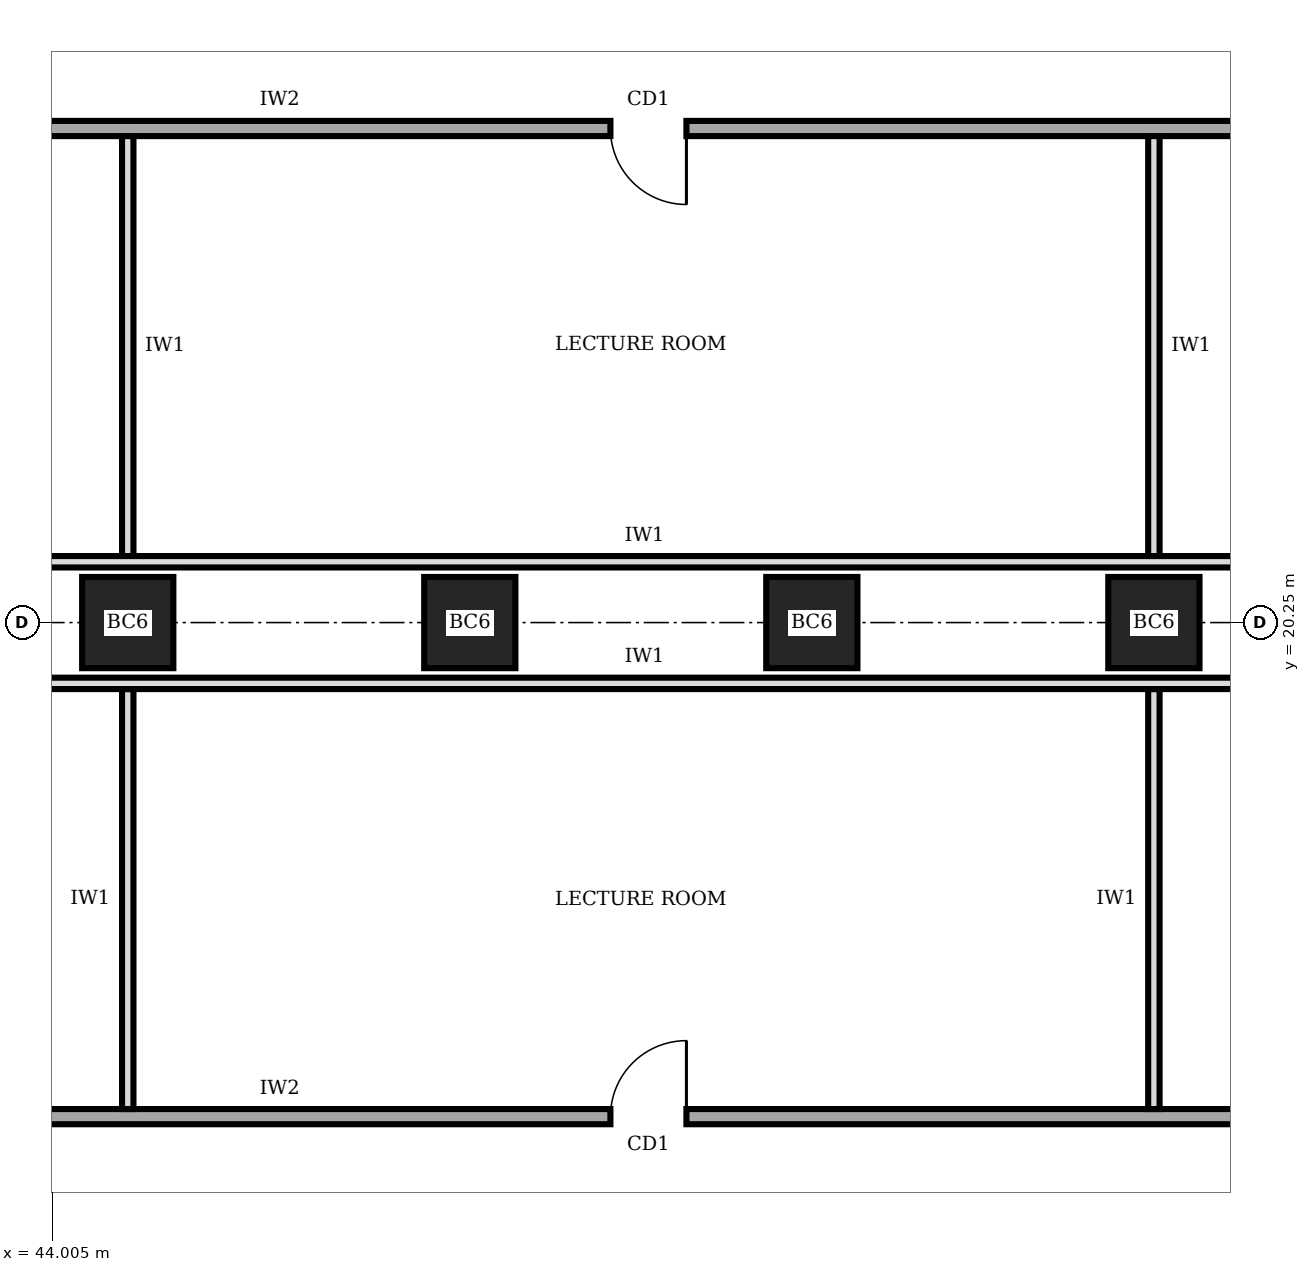
"""IFC4 building model, lengths in metres.
Left out: names, types, materials, properties, quantities, classifications, styles, units other than length and angle.
Written with IfcOpenShell. Run it as: python <this file> out.ifc"""

import sys

from ifc_helpers import new_model, si_unit, direction, frame, frame_2d, origin, origin_2d, place, context, subcontext, project, spatial, rectangle, extrude, element, fill, save


model = new_model("IFC4")
c1 = context("Model", 3, precision=1e-05, world=origin(), true_north=direction((0.0, 1.0)))
c2 = subcontext(c1, "Body", "Model", "MODEL_VIEW")
j1 = project(units=[si_unit("LENGTHUNIT", "METRE"), si_unit("PLANEANGLEUNIT", "RADIAN")], contexts=[c1])
p1 = place(None, origin())
s1 = spatial("IfcSite", under=j1, at=p1, CompositionType="ELEMENT")
p2 = place(p1, origin())
s2 = spatial("IfcBuilding", under=s1, at=p2, CompositionType="ELEMENT")
p3 = place(p2, frame((0.0, 0.0, 113.0)))
s3 = spatial("IfcBuildingStorey", under=s2, at=p3, CompositionType="ELEMENT", Elevation=113.0)
for number, where, z_axis, x_axis in (
    (1, (45.0, 20.25, 0.0), (0.0, 0.0, 1.0), (1.0, 0.0, 0.0)),
    (2, (49.5, 20.25, 0.0), (0.0, 0.0, 1.0), (1.0, 0.0, 0.0)),
    (3, (54.0, 20.25, 0.0), (0.0, 0.0, 1.0), (1.0, 0.0, 0.0)),
    (4, (58.5, 20.25, 0.0), (0.0, 0.0, 1.0), (1.0, 0.0, 0.0)),
):
    element("IfcColumn", number, at=place(p3, frame(where, z_axis=z_axis, x_axis=x_axis)), inside=s3, PredefinedType="COLUMN", context=c2, shape_type="SweptSolid", body=[
        extrude(rectangle(XDim=1.2, YDim=1.2, at=origin_2d()), origin(), (0.0, 0.0, 1.0), 4.0),
    ])
p4 = place(p3, frame((40.0, 13.75, 0.0), z_axis=(0.0, 0.0, 1.0), x_axis=(1.0, 0.0, 0.0)))
e5 = element("IfcWall", 5, at=p4, inside=s3, PredefinedType="SOLIDWALL", context=c2, shape_type="SweptSolid", body=[
    extrude(rectangle(XDim=23.5, YDim=0.2, at=frame_2d((11.75, 0.0))), origin(), (0.0, 0.0, 1.0), 3.75),
])
p5 = place(p4, frame((1.65, 0.0, 0.0)))
e6 = element("IfcOpeningElement", 6, at=p5, cuts=e5, PredefinedType="OPENING", context=c2, shape_type="SweptSolid", body=[
    extrude(rectangle(XDim=1.0, YDim=2.1, at=frame_2d((0.5, 1.05))), frame((0.0, 0.11, 0.0), z_axis=(0.0, -1.0, 0.0), x_axis=(1.0, 0.0, 0.0)), (0.0, 0.0, 1.0), 0.22),
])
p6 = place(p4, frame((11.35, 0.0, 0.0)))
e7 = element("IfcOpeningElement", 7, at=p6, cuts=e5, PredefinedType="OPENING", context=c2, shape_type="SweptSolid", body=[
    extrude(rectangle(XDim=1.0, YDim=2.1, at=frame_2d((0.5, 1.05))), frame((0.0, 0.11, 0.0), z_axis=(0.0, -1.0, 0.0), x_axis=(1.0, 0.0, 0.0)), (0.0, 0.0, 1.0), 0.22),
])
p7 = place(p4, frame((20.6, 0.0, 0.0)))
e8 = element("IfcOpeningElement", 8, at=p7, cuts=e5, PredefinedType="OPENING", context=c2, shape_type="SweptSolid", body=[
    extrude(rectangle(XDim=1.0, YDim=2.1, at=frame_2d((0.5, 1.05))), frame((0.0, 0.11, 0.0), z_axis=(0.0, -1.0, 0.0), x_axis=(1.0, 0.0, 0.0)), (0.0, 0.0, 1.0), 0.22),
])
p8 = place(p3, frame((40.0, 26.75, 0.0), z_axis=(0.0, 0.0, 1.0), x_axis=(1.0, 0.0, 0.0)))
e9 = element("IfcWall", 9, at=p8, inside=s3, PredefinedType="SOLIDWALL", context=c2, shape_type="SweptSolid", body=[
    extrude(rectangle(XDim=23.5, YDim=0.2, at=frame_2d((11.75, 0.0))), origin(), (0.0, 0.0, 1.0), 3.75),
])
p9 = place(p8, frame((1.65, 0.0, 0.0)))
e10 = element("IfcOpeningElement", 10, at=p9, cuts=e9, PredefinedType="OPENING", context=c2, shape_type="SweptSolid", body=[
    extrude(rectangle(XDim=1.0, YDim=2.1, at=frame_2d((0.5, 1.05))), frame((0.0, 0.11, 0.0), z_axis=(0.0, -1.0, 0.0), x_axis=(1.0, 0.0, 0.0)), (0.0, 0.0, 1.0), 0.22),
])
p10 = place(p8, frame((11.35, 0.0, 0.0)))
e11 = element("IfcOpeningElement", 11, at=p10, cuts=e9, PredefinedType="OPENING", context=c2, shape_type="SweptSolid", body=[
    extrude(rectangle(XDim=1.0, YDim=2.1, at=frame_2d((0.5, 1.05))), frame((0.0, 0.11, 0.0), z_axis=(0.0, -1.0, 0.0), x_axis=(1.0, 0.0, 0.0)), (0.0, 0.0, 1.0), 0.22),
])
p11 = place(p8, frame((20.6, 0.0, 0.0)))
e12 = element("IfcOpeningElement", 12, at=p11, cuts=e9, PredefinedType="OPENING", context=c2, shape_type="SweptSolid", body=[
    extrude(rectangle(XDim=1.0, YDim=2.1, at=frame_2d((0.5, 1.05))), frame((0.0, 0.11, 0.0), z_axis=(0.0, -1.0, 0.0), x_axis=(1.0, 0.0, 0.0)), (0.0, 0.0, 1.0), 0.22),
])
for number, where, z_axis, x_axis in (
    (13, (37.32, 19.45, 0.0), (0.0, 0.0, 1.0), (1.0, 0.0, 0.0)),
    (14, (37.32, 21.05, 0.0), (0.0, 0.0, 1.0), (1.0, 0.0, 0.0)),
):
    element("IfcWall", number, at=place(p3, frame(where, z_axis=z_axis, x_axis=x_axis)), inside=s3, PredefinedType="PARTITIONING", context=c2, shape_type="SweptSolid", body=[
        extrude(rectangle(XDim=28.96, YDim=0.15, at=frame_2d((14.48, 0.0))), origin(), (0.0, 0.0, 1.0), 3.75),
    ])
for number, where, z_axis, x_axis in (
    (15, (45.0, 13.85, 0.0), (0.0, 0.0, 1.0), (0.0, 1.0, 0.0)),
    (16, (58.5, 13.85, 0.0), (0.0, 0.0, 1.0), (0.0, 1.0, 0.0)),
    (17, (45.0, 26.65, 0.0), (0.0, 0.0, 1.0), (0.0, -1.0, 0.0)),
    (18, (58.5, 26.65, 0.0), (0.0, 0.0, 1.0), (0.0, -1.0, 0.0)),
):
    element("IfcWall", number, at=place(p3, frame(where, z_axis=z_axis, x_axis=x_axis)), inside=s3, PredefinedType="PARTITIONING", context=c2, shape_type="SweptSolid", body=[
        extrude(rectangle(XDim=5.525, YDim=0.15, at=frame_2d((2.762, 0.0))), origin(), (0.0, 0.0, 1.0), 2.83),
    ])
p12 = place(p6, origin())
e19 = element("IfcDoor", 19, at=p12, inside=s3, OperationType="SINGLE_SWING_RIGHT", PredefinedType="DOOR", context=c2, shape_type="SweptSolid", body=[
    extrude(rectangle(XDim=1.0, YDim=2.1, at=frame_2d((0.5, 1.05))), frame((0.0, 0.025, 0.0), z_axis=(0.0, -1.0, 0.0), x_axis=(1.0, 0.0, 0.0)), (0.0, 0.0, 1.0), 0.05),
])
fill(e7, e19)
p13 = place(p10, frame((1.0, 0.0, 0.0), z_axis=(0.0, 0.0, 1.0), x_axis=(-1.0, 0.0, 0.0)))
e20 = element("IfcDoor", 20, at=p13, inside=s3, OperationType="SINGLE_SWING_LEFT", PredefinedType="DOOR", context=c2, shape_type="SweptSolid", body=[
    extrude(rectangle(XDim=1.0, YDim=2.1, at=frame_2d((0.5, 1.05))), frame((0.0, 0.025, 0.0), z_axis=(0.0, -1.0, 0.0), x_axis=(1.0, 0.0, 0.0)), (0.0, 0.0, 1.0), 0.05),
])
fill(e11, e20)
save(model, sys.argv[1])
